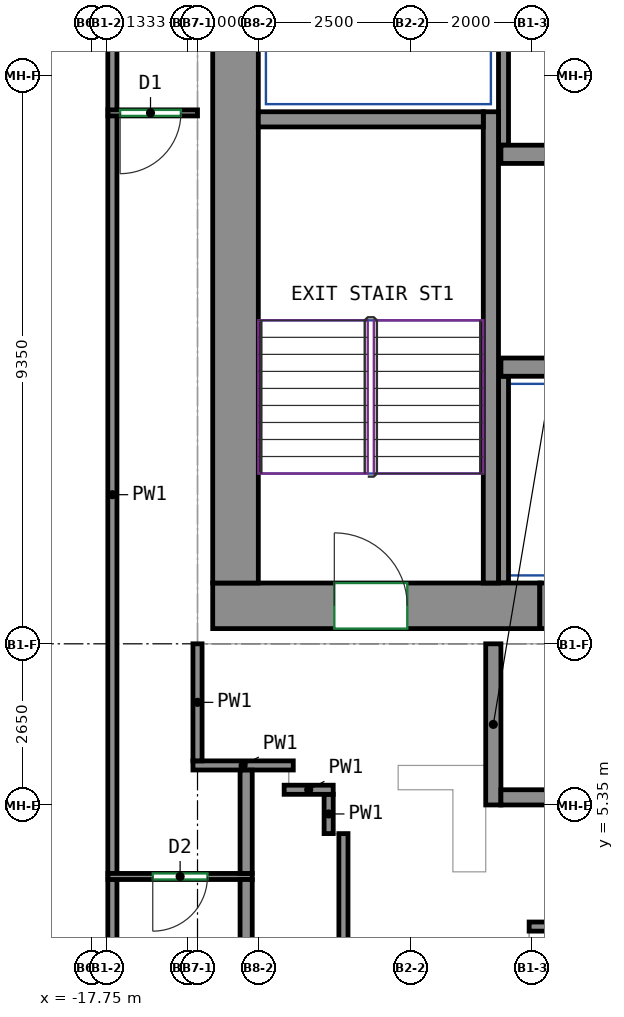
"""IFC4 building model, lengths in metres.
Left out: names, types, materials, properties, quantities, classifications, styles, units other than length and angle.
Written with IfcOpenShell. Run it as: python <this file> out.ifc"""

import sys

from ifc_helpers import new_model, si_unit, direction, frame, frame_2d, origin, place, context, subcontext, project, spatial, rectangle, extrude, source, transform, mapped, element, fill, save


model = new_model("IFC4")
c1 = context("Model", 3, precision=1e-05, world=origin(), true_north=direction((0.0, 1.0)))
c2 = subcontext(c1, "Body", "Model", "MODEL_VIEW")
j1 = project(units=[si_unit("LENGTHUNIT", "METRE"), si_unit("PLANEANGLEUNIT", "RADIAN")], contexts=[c1])
p1 = place(None, origin())
s1 = spatial("IfcSite", under=j1, at=p1, CompositionType="ELEMENT")
p2 = place(p1, origin())
s2 = spatial("IfcBuilding", under=s1, at=p2, CompositionType="ELEMENT")
p3 = place(p2, frame((0.0, 0.0, 245.8)))
s3 = spatial("IfcBuildingStorey", under=s2, at=p3, CompositionType="ELEMENT", Elevation=245.8)
m1 = source(origin(), c2, "Body", "SweptSolid", [
    extrude(rectangle(XDim=5.38, YDim=0.75, at=frame_2d((2.69, 0.0))), origin(), (0.0, 0.0, 1.0), 3.12),
])
p4 = place(p3, frame((-15.75, 8.625, 0.0), z_axis=(0.0, 0.0, 1.0), x_axis=(1.0, 0.0, 0.0)))
e1 = element("IfcWall", 1, at=p4, inside=s3, PredefinedType="SHEAR", context=c2, shape_type="MappedRepresentation", body=[
    mapped(m1, transform((0.0, 0.0, 0.0))),
])
p5 = place(p4, frame((2.0, 0.0, 0.0)))
e2 = element("IfcOpeningElement", 2, at=p5, cuts=e1, PredefinedType="OPENING", context=c2, shape_type="SweptSolid", body=[
    extrude(rectangle(XDim=1.2, YDim=2.1, at=frame_2d((0.6, 1.05))), frame((0.0, 0.385, 0.0), z_axis=(0.0, -1.0, 0.0), x_axis=(1.0, 0.0, 0.0)), (0.0, 0.0, 1.0), 0.77),
])
m2 = source(origin(), c2, "Body", "SweptSolid", [
    extrude(rectangle(XDim=12.0, YDim=0.75, at=frame_2d((6.0, 0.0))), origin(), (0.0, 0.0, 1.0), 3.12),
])
p6 = place(p3, frame((-15.375, 9.0, 0.0), z_axis=(0.0, 0.0, 1.0), x_axis=(0.0, 1.0, 0.0)))
e3 = element("IfcWall", 3, at=p6, inside=s3, PredefinedType="SHEAR", context=c2, shape_type="MappedRepresentation", body=[
    mapped(m2, transform((0.0, 0.0, 0.0))),
])
m3 = source(origin(), c2, "Body", "SweptSolid", [
    extrude(rectangle(XDim=7.75, YDim=0.25, at=frame_2d((3.875, 0.0))), origin(), (0.0, 0.0, 1.0), 3.12),
])
p7 = place(p3, frame((-11.175, 9.0, 0.0), z_axis=(0.0, 0.0, 1.0), x_axis=(0.0, 1.0, 0.0)))
e4 = element("IfcWall", 4, at=p7, inside=s3, PredefinedType="SHEAR", context=c2, shape_type="MappedRepresentation", body=[
    mapped(m3, transform((0.0, 0.0, 0.0))),
])
m4 = source(origin(), c2, "Body", "SweptSolid", [
    extrude(rectangle(XDim=3.7, YDim=0.25, at=frame_2d((1.85, 0.0))), origin(), (0.0, 0.0, 1.0), 3.12),
])
p8 = place(p3, frame((-15.0, 16.625, 0.0), z_axis=(0.0, 0.0, 1.0), x_axis=(1.0, 0.0, 0.0)))
e5 = element("IfcWall", 5, at=p8, inside=s3, PredefinedType="SHEAR", context=c2, shape_type="MappedRepresentation", body=[
    mapped(m4, transform((0.0, 0.0, 0.0))),
])
m5 = source(origin(), c2, "Body", "SweptSolid", [
    extrude(rectangle(XDim=6.0, YDim=0.3, at=frame_2d((3.0, 0.0))), origin(), (0.0, 0.0, 1.0), 3.12),
])
p9 = place(p3, frame((-11.01, 12.55, 0.0), z_axis=(0.0, 0.0, 1.0), x_axis=(1.0, 0.0, 0.0)))
e6 = element("IfcWall", 6, at=p9, inside=s3, PredefinedType="SHEAR", context=c2, shape_type="MappedRepresentation", body=[
    mapped(m5, transform((0.0, 0.0, 0.0))),
])
m6 = source(origin(), c2, "Body", "SweptSolid", [
    extrude(rectangle(XDim=22.08, YDim=0.3, at=frame_2d((11.04, 0.0))), origin(), (0.0, 0.0, 1.0), 3.12),
])
p10 = place(p3, frame((-11.01, 16.05, 0.0), z_axis=(0.0, 0.0, 1.0), x_axis=(1.0, 0.0, 0.0)))
e7 = element("IfcWall", 7, at=p10, inside=s3, PredefinedType="SHEAR", context=c2, shape_type="MappedRepresentation", body=[
    mapped(m6, transform((0.0, 0.0, 0.0))),
])
m7 = source(origin(), c2, "Body", "SweptSolid", [
    extrude(rectangle(XDim=2.65, YDim=0.25, at=frame_2d((1.325, 0.0))), origin(), (0.0, 0.0, 1.0), 2.57),
])
p11 = place(p3, frame((-11.135, 5.35, 0.0), z_axis=(0.0, 0.0, 1.0), x_axis=(0.0, 1.0, 0.0)))
e8 = element("IfcWall", 8, at=p11, inside=s3, PredefinedType="PARTITIONING", context=c2, shape_type="MappedRepresentation", body=[
    mapped(m7, transform((0.0, 0.0, 0.0))),
])
m8 = source(origin(), c2, "Body", "SweptSolid", [
    extrude(rectangle(XDim=5.36, YDim=0.25, at=frame_2d((2.68, 0.0))), origin(), (0.0, 0.0, 1.0), 3.12),
])
p12 = place(p3, frame((-11.01, 5.475, 0.0), z_axis=(0.0, 0.0, 1.0), x_axis=(1.0, 0.0, 0.0)))
e9 = element("IfcWall", 9, at=p12, inside=s3, PredefinedType="PARTITIONING", context=c2, shape_type="MappedRepresentation", body=[
    mapped(m8, transform((0.0, 0.0, 0.0))),
])
p13 = place(p12, frame((2.28, 0.0, 0.0)))
e10 = element("IfcOpeningElement", 10, at=p13, cuts=e9, PredefinedType="OPENING", context=c2, shape_type="SweptSolid", body=[
    extrude(rectangle(XDim=0.8, YDim=2.0, at=frame_2d((0.4, 1.0))), frame((0.0, 0.135, 0.0), z_axis=(0.0, -1.0, 0.0), x_axis=(1.0, 0.0, 0.0)), (0.0, 0.0, 1.0), 0.27),
])
m9 = source(origin(), c2, "Body", "SweptSolid", [
    extrude(rectangle(XDim=4.8, YDim=0.165, at=frame_2d((2.4, 0.0))), origin(), (0.0, 0.0, 1.0), 3.12),
])
p14 = place(p3, frame((-10.968, 16.2, 0.0), z_axis=(0.0, 0.0, 1.0), x_axis=(0.0, 1.0, 0.0)))
e11 = element("IfcWall", 11, at=p14, inside=s3, PredefinedType="PARTITIONING", context=c2, shape_type="MappedRepresentation", body=[
    mapped(m9, transform((0.0, 0.0, 0.0))),
])
m10 = source(origin(), c2, "Body", "SweptSolid", [
    extrude(rectangle(XDim=3.4, YDim=0.165, at=frame_2d((1.7, 0.0))), origin(), (0.0, 0.0, 1.0), 3.12),
])
p15 = place(p3, frame((-10.968, 9.0, 0.0), z_axis=(0.0, 0.0, 1.0), x_axis=(0.0, 1.0, 0.0)))
e12 = element("IfcWall", 12, at=p15, inside=s3, PredefinedType="PARTITIONING", context=c2, shape_type="MappedRepresentation", body=[
    mapped(m10, transform((0.0, 0.0, 0.0))),
])
m11 = source(origin(), c2, "Body", "SweptSolid", [
    extrude(rectangle(XDim=1.4, YDim=0.75, at=frame_2d((0.7, 0.0))), origin(), (0.0, 0.0, 1.0), 2.7),
])
p16 = place(p3, frame((-10.37, 8.625, 0.0), z_axis=(0.0, 0.0, 1.0), x_axis=(1.0, 0.0, 0.0)))
e13 = element("IfcWall", 13, at=p16, inside=s3, PredefinedType="PARTITIONING", context=c2, shape_type="MappedRepresentation", body=[
    mapped(m11, transform((0.0, 0.0, 0.0))),
])
p17 = place(p16, frame((0.25, 0.0, 0.0)))
e14 = element("IfcOpeningElement", 14, at=p17, cuts=e13, PredefinedType="OPENING", context=c2, shape_type="SweptSolid", body=[
    extrude(rectangle(XDim=0.9, YDim=2.1, at=frame_2d((0.45, 1.05))), frame((0.0, 0.385, 0.0), z_axis=(0.0, -1.0, 0.0), x_axis=(1.0, 0.0, 0.0)), (0.0, 0.0, 1.0), 0.77),
])
p18 = place(p3, frame((-17.4, -1.791, 0.0), z_axis=(0.0, 0.0, 1.0), x_axis=(0.0, 1.0, 0.0)))
e15 = element("IfcWall", 15, at=p18, inside=s3, PredefinedType="PARTITIONING", context=c2, shape_type="SweptSolid", body=[
    extrude(rectangle(XDim=5.925, YDim=0.15, at=frame_2d((2.962, 0.0))), origin(), (0.0, 0.0, 1.0), 3.12),
])
p19 = place(p3, frame((-17.4, 4.214, 0.0), z_axis=(0.0, 0.0, 1.0), x_axis=(0.0, 1.0, 0.0)))
e16 = element("IfcWall", 16, at=p19, inside=s3, PredefinedType="PARTITIONING", context=c2, shape_type="SweptSolid", body=[
    extrude(rectangle(XDim=12.477, YDim=0.15, at=frame_2d((6.238, 0.0))), origin(), (0.0, 0.0, 1.0), 3.12),
])
p20 = place(p3, frame((-16.075, 6.0, 0.0), z_axis=(0.0, 0.0, 1.0), x_axis=(1.0, 0.0, 0.0)))
e17 = element("IfcWall", 17, at=p20, inside=s3, PredefinedType="PARTITIONING", context=c2, shape_type="SweptSolid", body=[
    extrude(rectangle(XDim=1.65, YDim=0.15, at=frame_2d((0.825, 0.0))), origin(), (0.0, 0.0, 1.0), 3.12),
])
p21 = place(p3, frame((-16.0, 6.075, 0.0), z_axis=(0.0, 0.0, 1.0), x_axis=(0.0, 1.0, 0.0)))
e18 = element("IfcWall", 18, at=p21, inside=s3, PredefinedType="PARTITIONING", context=c2, shape_type="SweptSolid", body=[
    extrude(rectangle(XDim=1.925, YDim=0.15, at=frame_2d((0.962, 0.0))), origin(), (0.0, 0.0, 1.0), 3.12),
])
p22 = place(p3, frame((-17.4, 16.771, 0.0), z_axis=(0.0, 0.0, 1.0), x_axis=(0.0, 1.0, 0.0)))
e19 = element("IfcWall", 19, at=p22, inside=s3, PredefinedType="PARTITIONING", context=c2, shape_type="SweptSolid", body=[
    extrude(rectangle(XDim=4.254, YDim=0.15, at=frame_2d((2.127, 0.0))), origin(), (0.0, 0.0, 1.0), 3.12),
])
p23 = place(p3, frame((-13.6, 4.879, 0.0), z_axis=(0.0, 0.0, 1.0), x_axis=(0.0, -1.0, 0.0)))
e20 = element("IfcWall", 20, at=p23, inside=s3, PredefinedType="PARTITIONING", context=c2, shape_type="SweptSolid", body=[
    extrude(rectangle(XDim=11.004, YDim=0.15, at=frame_2d((5.502, 0.0))), origin(), (0.0, 0.0, 1.0), 3.12),
])
p24 = place(p23, frame((7.103, 0.0, 0.0)))
e21 = element("IfcOpeningElement", 21, at=p24, cuts=e20, PredefinedType="OPENING", context=c2, shape_type="SweptSolid", body=[
    extrude(rectangle(XDim=0.9, YDim=2.1, at=frame_2d((0.45, 1.05))), frame((0.0, 0.085, 0.0), z_axis=(0.0, -1.0, 0.0), x_axis=(1.0, 0.0, 0.0)), (0.0, 0.0, 1.0), 0.17),
])
p25 = place(p3, frame((-13.843, 5.525, 0.0), z_axis=(0.0, 0.0, 1.0), x_axis=(0.0, -1.0, 0.0)))
e22 = element("IfcWall", 22, at=p25, inside=s3, PredefinedType="PARTITIONING", context=c2, shape_type="SweptSolid", body=[
    extrude(rectangle(XDim=0.646, YDim=0.15, at=frame_2d((0.323, 0.0))), origin(), (0.0, 0.0, 1.0), 3.12),
])
p26 = place(p3, frame((-14.575, 5.6, 0.0), z_axis=(0.0, 0.0, 1.0), x_axis=(1.0, 0.0, 0.0)))
e23 = element("IfcWall", 23, at=p26, inside=s3, PredefinedType="PARTITIONING", context=c2, shape_type="SweptSolid", body=[
    extrude(rectangle(XDim=0.807, YDim=0.15, at=frame_2d((0.403, 0.0))), origin(), (0.0, 0.0, 1.0), 3.12),
])
p27 = place(p3, frame((-10.546, 3.35, 0.0), z_axis=(0.0, 0.0, 1.0), x_axis=(1.0, 0.0, 0.0)))
e24 = element("IfcWall", 24, at=p27, inside=s3, PredefinedType="PARTITIONING", context=c2, shape_type="SweptSolid", body=[
    extrude(rectangle(XDim=4.146, YDim=0.15, at=frame_2d((2.073, 0.0))), origin(), (0.0, 0.0, 1.0), 3.12),
])
p28 = place(p3, frame((-15.1, 4.174, 0.0), z_axis=(0.0, 0.0, 1.0), x_axis=(-1.0, 0.0, 0.0)))
e25 = element("IfcWall", 25, at=p28, inside=s3, PredefinedType="PARTITIONING", context=c2, shape_type="SweptSolid", body=[
    extrude(rectangle(XDim=2.373, YDim=0.1, at=frame_2d((1.187, 0.0))), origin(), (0.0, 0.0, 1.0), 3.12),
])
p29 = place(p28, frame((0.736, 0.0, 0.0)))
e26 = element("IfcOpeningElement", 26, at=p29, cuts=e25, PredefinedType="OPENING", context=c2, shape_type="SweptSolid", body=[
    extrude(rectangle(XDim=0.9, YDim=2.1, at=frame_2d((0.45, 1.05))), frame((0.0, 0.06, 0.0), z_axis=(0.0, -1.0, 0.0), x_axis=(1.0, 0.0, 0.0)), (0.0, 0.0, 1.0), 0.12),
])
p30 = place(p3, frame((-15.2, -1.781, 0.0), z_axis=(0.0, 0.0, 1.0), x_axis=(0.0, 1.0, 0.0)))
e27 = element("IfcWall", 27, at=p30, inside=s3, PredefinedType="PARTITIONING", context=c2, shape_type="SweptSolid", body=[
    extrude(rectangle(XDim=5.905, YDim=0.2, at=frame_2d((2.953, 0.0))), origin(), (0.0, 0.0, 1.0), 3.12),
])
p31 = place(p3, frame((-16.0, 16.731, 0.0), z_axis=(0.0, 0.0, 1.0), x_axis=(-1.0, 0.0, 0.0)))
e28 = element("IfcWall", 28, at=p31, inside=s3, PredefinedType="PARTITIONING", context=c2, shape_type="SweptSolid", body=[
    extrude(rectangle(XDim=1.473, YDim=0.1, at=frame_2d((0.736, 0.0))), origin(), (0.0, 0.0, 1.0), 3.12),
])
p32 = place(p31, frame((0.273, 0.0, 0.0)))
e29 = element("IfcOpeningElement", 29, at=p32, cuts=e28, PredefinedType="OPENING", context=c2, shape_type="SweptSolid", body=[
    extrude(rectangle(XDim=1.0, YDim=2.1, at=frame_2d((0.5, 1.05))), frame((0.0, 0.06, 0.0), z_axis=(0.0, -1.0, 0.0), x_axis=(1.0, 0.0, 0.0)), (0.0, 0.0, 1.0), 0.12),
])
p33 = place(p3, frame((-15.2, 4.224, 0.0), z_axis=(0.0, 0.0, 1.0), x_axis=(0.0, 1.0, 0.0)))
e30 = element("IfcWall", 30, at=p33, inside=s3, PredefinedType="PARTITIONING", context=c2, shape_type="SweptSolid", body=[
    extrude(rectangle(XDim=1.699, YDim=0.2, at=frame_2d((0.85, 0.0))), origin(), (0.0, 0.0, 1.0), 3.12),
])
p34 = place(p5, origin())
e31 = element("IfcDoor", 31, at=p34, inside=s3, OperationType="DOUBLE_DOOR_SINGLE_SWING", PredefinedType="DOOR", context=c2, shape_type="SweptSolid", body=[
    extrude(rectangle(XDim=1.2, YDim=2.1, at=frame_2d((0.6, 1.05))), frame((0.0, 0.28, 0.0), z_axis=(0.0, -1.0, 0.0), x_axis=(1.0, 0.0, 0.0)), (0.0, 0.0, 1.0), 0.05),
])
fill(e2, e31)
p35 = place(p29, origin())
e32 = element("IfcDoor", 32, at=p35, inside=s3, OperationType="SINGLE_SWING_RIGHT", PredefinedType="DOOR", context=c2, shape_type="SweptSolid", body=[
    extrude(rectangle(XDim=0.9, YDim=2.1, at=frame_2d((0.45, 1.05))), frame((0.0, 0.025, 0.0), z_axis=(0.0, -1.0, 0.0), x_axis=(1.0, 0.0, 0.0)), (0.0, 0.0, 1.0), 0.05),
])
fill(e26, e32)
p36 = place(p32, origin())
e33 = element("IfcDoor", 33, at=p36, inside=s3, OperationType="SINGLE_SWING_RIGHT", PredefinedType="DOOR", context=c2, shape_type="SweptSolid", body=[
    extrude(rectangle(XDim=1.0, YDim=2.1, at=frame_2d((0.5, 1.05))), frame((0.0, 0.025, 0.0), z_axis=(0.0, -1.0, 0.0), x_axis=(1.0, 0.0, 0.0)), (0.0, 0.0, 1.0), 0.05),
])
fill(e29, e33)
save(model, sys.argv[1])
